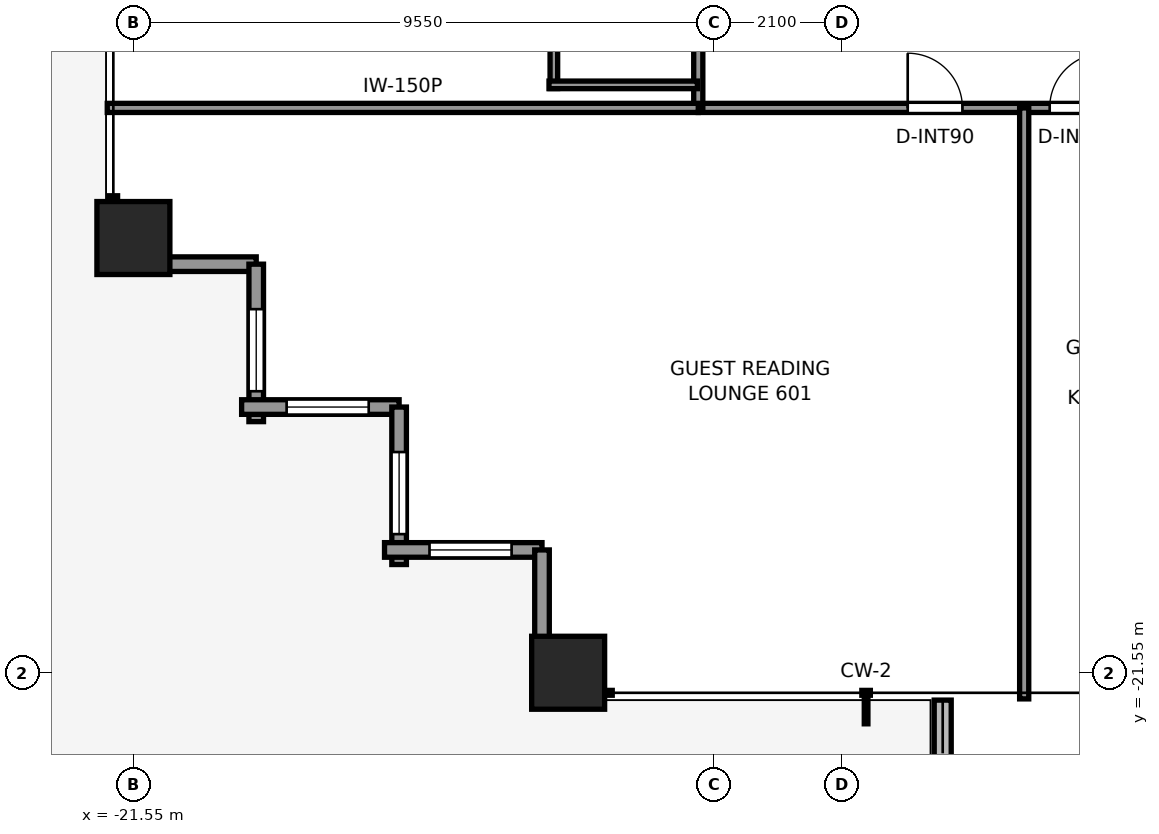
"""IFC4 building model, lengths in metres.
Left out: names, types, materials, properties, quantities, classifications, styles, units other than length and angle.
Written with IfcOpenShell. Run it as: python <this file> out.ifc"""

import sys

from ifc_helpers import new_model, si_unit, direction, frame, frame_2d, origin, origin_2d, place, context, subcontext, project, spatial, rectangle, extrude, element, fill, save


model = new_model("IFC4")
c1 = context("Model", 3, precision=1e-05, world=origin(), true_north=direction((0.0, 1.0)))
c2 = subcontext(c1, "Body", "Model", "MODEL_VIEW")
j1 = project(units=[si_unit("LENGTHUNIT", "METRE"), si_unit("PLANEANGLEUNIT", "RADIAN")], contexts=[c1])
p1 = place(None, origin())
s1 = spatial("IfcSite", under=j1, at=p1, CompositionType="ELEMENT")
p2 = place(p1, origin())
s2 = spatial("IfcBuilding", under=s1, at=p2, CompositionType="ELEMENT")
p3 = place(p2, frame((0.0, 0.0, 23.8)))
s3 = spatial("IfcBuildingStorey", under=s2, at=p3, CompositionType="ELEMENT", Elevation=23.8)
for number, where, z_axis, x_axis in (
    (1, (-14.4, -21.55, 0.0), (0.0, 0.0, 1.0), (1.0, 0.0, 0.0)),
    (2, (-21.55, -14.4, 0.0), (0.0, 0.0, 1.0), (1.0, 0.0, 0.0)),
):
    element("IfcColumn", number, at=place(p3, frame(where, z_axis=z_axis, x_axis=x_axis)), inside=s3, PredefinedType="COLUMN", context=c2, shape_type="SweptSolid", body=[
        extrude(rectangle(XDim=1.2, YDim=1.2, at=origin_2d()), origin(), (0.0, 0.0, 1.0), 3.3),
    ])
p4 = place(p3, frame((-8.24, -22.0, -0.06), z_axis=(0.0, 0.0, 1.0), x_axis=(0.0, -1.0, 0.0)))
e3 = element("IfcWall", 3, at=p4, inside=s3, PredefinedType="PARAPET", context=c2, shape_type="SweptSolid", body=[
    extrude(rectangle(XDim=2.674, YDim=0.28, at=frame_2d((1.337, 0.0))), origin(), (0.0, 0.0, 1.0), 0.42),
])
p5 = place(p3, frame((-19.53, -14.83, 0.0), z_axis=(0.0, 0.0, 1.0), x_axis=(-1.0, 0.0, 0.0)))
e4 = element("IfcWall", 4, at=p5, inside=s3, PredefinedType="STANDARD", context=c2, shape_type="SweptSolid", body=[
    extrude(rectangle(XDim=2.59, YDim=0.24, at=frame_2d((1.295, 0.0))), origin(), (0.0, 0.0, 1.0), 2.439),
])
p6 = place(p3, frame((-19.53, -17.42, 0.0), z_axis=(0.0, 0.0, 1.0), x_axis=(0.0, 1.0, 0.0)))
e5 = element("IfcWall", 5, at=p6, inside=s3, PredefinedType="STANDARD", context=c2, shape_type="SweptSolid", body=[
    extrude(rectangle(XDim=2.59, YDim=0.24, at=frame_2d((1.295, 0.0))), origin(), (0.0, 0.0, 1.0), 2.439),
])
p7 = place(p6, frame((0.5, 0.0, 0.65)))
e6 = element("IfcOpeningElement", 6, at=p7, cuts=e5, PredefinedType="OPENING", context=c2, shape_type="SweptSolid", body=[
    extrude(rectangle(XDim=1.35, YDim=1.55, at=frame_2d((0.675, 0.775))), frame((0.0, 0.13, 0.0), z_axis=(0.0, -1.0, 0.0), x_axis=(1.0, 0.0, 0.0)), (0.0, 0.0, 1.0), 0.26),
])
p8 = place(p3, frame((-17.18, -17.18, 0.0), z_axis=(0.0, 0.0, 1.0), x_axis=(-1.0, 0.0, 0.0)))
e7 = element("IfcWall", 7, at=p8, inside=s3, PredefinedType="STANDARD", context=c2, shape_type="SweptSolid", body=[
    extrude(rectangle(XDim=2.59, YDim=0.24, at=frame_2d((1.295, 0.0))), origin(), (0.0, 0.0, 1.0), 2.439),
])
p9 = place(p8, frame((0.5, 0.0, 0.65)))
e8 = element("IfcOpeningElement", 8, at=p9, cuts=e7, PredefinedType="OPENING", context=c2, shape_type="SweptSolid", body=[
    extrude(rectangle(XDim=1.35, YDim=1.55, at=frame_2d((0.675, 0.775))), frame((0.0, 0.13, 0.0), z_axis=(0.0, -1.0, 0.0), x_axis=(1.0, 0.0, 0.0)), (0.0, 0.0, 1.0), 0.26),
])
p10 = place(p3, frame((-17.18, -19.77, 0.0), z_axis=(0.0, 0.0, 1.0), x_axis=(0.0, 1.0, 0.0)))
e9 = element("IfcWall", 9, at=p10, inside=s3, PredefinedType="STANDARD", context=c2, shape_type="SweptSolid", body=[
    extrude(rectangle(XDim=2.59, YDim=0.24, at=frame_2d((1.295, 0.0))), origin(), (0.0, 0.0, 1.0), 2.439),
])
p11 = place(p10, frame((0.5, 0.0, 0.65)))
e10 = element("IfcOpeningElement", 10, at=p11, cuts=e9, PredefinedType="OPENING", context=c2, shape_type="SweptSolid", body=[
    extrude(rectangle(XDim=1.35, YDim=1.55, at=frame_2d((0.675, 0.775))), frame((0.0, 0.13, 0.0), z_axis=(0.0, -1.0, 0.0), x_axis=(1.0, 0.0, 0.0)), (0.0, 0.0, 1.0), 0.26),
])
p12 = place(p3, frame((-14.83, -19.53, 0.0), z_axis=(0.0, 0.0, 1.0), x_axis=(-1.0, 0.0, 0.0)))
e11 = element("IfcWall", 11, at=p12, inside=s3, PredefinedType="STANDARD", context=c2, shape_type="SweptSolid", body=[
    extrude(rectangle(XDim=2.59, YDim=0.24, at=frame_2d((1.295, 0.0))), origin(), (0.0, 0.0, 1.0), 2.439),
])
p13 = place(p12, frame((0.5, 0.0, 0.65)))
e12 = element("IfcOpeningElement", 12, at=p13, cuts=e11, PredefinedType="OPENING", context=c2, shape_type="SweptSolid", body=[
    extrude(rectangle(XDim=1.35, YDim=1.55, at=frame_2d((0.675, 0.775))), frame((0.0, 0.13, 0.0), z_axis=(0.0, -1.0, 0.0), x_axis=(1.0, 0.0, 0.0)), (0.0, 0.0, 1.0), 0.26),
])
p14 = place(p3, frame((-14.83, -22.12, 0.0), z_axis=(0.0, 0.0, 1.0), x_axis=(0.0, 1.0, 0.0)))
e13 = element("IfcWall", 13, at=p14, inside=s3, PredefinedType="STANDARD", context=c2, shape_type="SweptSolid", body=[
    extrude(rectangle(XDim=2.59, YDim=0.24, at=frame_2d((1.295, 0.0))), origin(), (0.0, 0.0, 1.0), 2.439),
])
p15 = place(p3, frame((-12.26, -12.26, 0.0), z_axis=(0.0, 0.0, 1.0), x_axis=(1.0, 0.0, 0.0)))
e14 = element("IfcWall", 14, at=p15, inside=s3, PredefinedType="PARTITIONING", context=c2, shape_type="SweptSolid", body=[
    extrude(rectangle(XDim=24.68, YDim=0.15, at=frame_2d((12.34, 0.0))), origin(), (0.0, 0.0, 1.0), 2.272),
])
p16 = place(p15, frame((3.444, 0.0, 0.0)))
e15 = element("IfcOpeningElement", 15, at=p16, cuts=e14, PredefinedType="OPENING", context=c2, shape_type="SweptSolid", body=[
    extrude(rectangle(XDim=0.9, YDim=2.06, at=frame_2d((0.45, 1.03))), frame((0.0, 0.085, 0.0), z_axis=(0.0, -1.0, 0.0), x_axis=(1.0, 0.0, 0.0)), (0.0, 0.0, 1.0), 0.17),
])
p17 = place(p15, frame((5.779, 0.0, 0.0)))
e16 = element("IfcOpeningElement", 16, at=p17, cuts=e14, PredefinedType="OPENING", context=c2, shape_type="SweptSolid", body=[
    extrude(rectangle(XDim=0.9, YDim=2.06, at=frame_2d((0.45, 1.03))), frame((0.0, 0.085, 0.0), z_axis=(0.0, -1.0, 0.0), x_axis=(1.0, 0.0, 0.0)), (0.0, 0.0, 1.0), 0.17),
])
p18 = place(p15, frame((13.551, 0.0, 0.0)))
e17 = element("IfcOpeningElement", 17, at=p18, cuts=e14, PredefinedType="OPENING", context=c2, shape_type="SweptSolid", body=[
    extrude(rectangle(XDim=0.9, YDim=2.06, at=frame_2d((0.45, 1.03))), frame((0.0, 0.085, 0.0), z_axis=(0.0, -1.0, 0.0), x_axis=(1.0, 0.0, 0.0)), (0.0, 0.0, 1.0), 0.17),
])
p19 = place(p15, frame((17.921, 0.0, 0.0)))
e18 = element("IfcOpeningElement", 18, at=p19, cuts=e14, PredefinedType="OPENING", context=c2, shape_type="SweptSolid", body=[
    extrude(rectangle(XDim=0.9, YDim=2.06, at=frame_2d((0.45, 1.03))), frame((0.0, 0.085, 0.0), z_axis=(0.0, -1.0, 0.0), x_axis=(1.0, 0.0, 0.0)), (0.0, 0.0, 1.0), 0.17),
])
p20 = place(p15, frame((20.256, 0.0, 0.0)))
e19 = element("IfcOpeningElement", 19, at=p20, cuts=e14, PredefinedType="OPENING", context=c2, shape_type="SweptSolid", body=[
    extrude(rectangle(XDim=0.9, YDim=2.06, at=frame_2d((0.45, 1.03))), frame((0.0, 0.085, 0.0), z_axis=(0.0, -1.0, 0.0), x_axis=(1.0, 0.0, 0.0)), (0.0, 0.0, 1.0), 0.17),
])
p21 = place(p3, frame((-12.26, -12.26, 0.0), z_axis=(0.0, 0.0, 1.0), x_axis=(0.0, 1.0, 0.0)))
e20 = element("IfcWall", 20, at=p21, inside=s3, PredefinedType="PARTITIONING", context=c2, shape_type="SweptSolid", body=[
    extrude(rectangle(XDim=24.84, YDim=0.15, at=frame_2d((12.42, 0.0))), origin(), (0.0, 0.0, 1.0), 2.272),
])
p22 = place(p21, frame((4.395, 0.0, 0.0)))
e21 = element("IfcOpeningElement", 21, at=p22, cuts=e20, PredefinedType="OPENING", context=c2, shape_type="SweptSolid", body=[
    extrude(rectangle(XDim=0.95, YDim=2.06, at=frame_2d((0.475, 1.03))), frame((0.0, 0.085, 0.0), z_axis=(0.0, -1.0, 0.0), x_axis=(1.0, 0.0, 0.0)), (0.0, 0.0, 1.0), 0.17),
])
p23 = place(p21, frame((13.815, 0.0, 0.0)))
e22 = element("IfcOpeningElement", 22, at=p23, cuts=e20, PredefinedType="OPENING", context=c2, shape_type="SweptSolid", body=[
    extrude(rectangle(XDim=0.95, YDim=2.06, at=frame_2d((0.475, 1.03))), frame((0.0, 0.085, 0.0), z_axis=(0.0, -1.0, 0.0), x_axis=(1.0, 0.0, 0.0)), (0.0, 0.0, 1.0), 0.17),
])
p24 = place(p21, frame((20.268, 0.0, 0.0)))
e23 = element("IfcOpeningElement", 23, at=p24, cuts=e20, PredefinedType="OPENING", context=c2, shape_type="SweptSolid", body=[
    extrude(rectangle(XDim=0.95, YDim=2.06, at=frame_2d((0.475, 1.03))), frame((0.0, 0.085, 0.0), z_axis=(0.0, -1.0, 0.0), x_axis=(1.0, 0.0, 0.0)), (0.0, 0.0, 1.0), 0.17),
])
p25 = place(p3, frame((-21.98, -12.26, 0.0), z_axis=(0.0, 0.0, 1.0), x_axis=(1.0, 0.0, 0.0)))
e24 = element("IfcWall", 24, at=p25, inside=s3, PredefinedType="PARTITIONING", context=c2, shape_type="SweptSolid", body=[
    extrude(rectangle(XDim=9.72, YDim=0.15, at=frame_2d((4.86, 0.0))), origin(), (0.0, 0.0, 1.0), 2.272),
])
p26 = place(p3, frame((-6.9, -21.98, 0.0), z_axis=(0.0, 0.0, 1.0), x_axis=(0.0, 1.0, 0.0)))
e25 = element("IfcWall", 25, at=p26, inside=s3, PredefinedType="PARTITIONING", context=c2, shape_type="SweptSolid", body=[
    extrude(rectangle(XDim=9.72, YDim=0.15, at=frame_2d((4.86, 0.0))), origin(), (0.0, 0.0, 1.0), 2.429),
])
p27 = place(p3, frame((-14.635, -11.941, 0.0), z_axis=(0.0, 0.0, 1.0), x_axis=(0.0, 1.0, 0.0)))
e26 = element("IfcWall", 26, at=p27, inside=s3, PredefinedType="PARTITIONING", context=c2, shape_type="SweptSolid", body=[
    extrude(rectangle(XDim=2.27, YDim=0.125, at=frame_2d((1.135, 0.0))), origin(), (0.0, 0.0, 1.0), 2.272),
])
p28 = place(p3, frame((-14.715, -11.881, 0.0), z_axis=(0.0, 0.0, 1.0), x_axis=(1.0, 0.0, 0.0)))
e27 = element("IfcWall", 27, at=p28, inside=s3, PredefinedType="PARTITIONING", context=c2, shape_type="SweptSolid", body=[
    extrude(rectangle(XDim=2.44, YDim=0.125, at=frame_2d((1.22, 0.0))), origin(), (0.0, 0.0, 1.0), 2.272),
])
p29 = place(p7, origin())
e28 = element("IfcWindow", 28, at=p29, inside=s3, PartitioningType="SINGLE_PANEL", PredefinedType="WINDOW", context=c2, shape_type="SweptSolid", body=[
    extrude(rectangle(XDim=1.35, YDim=1.55, at=frame_2d((0.675, 0.775))), frame((0.0, 0.03, 0.0), z_axis=(0.0, -1.0, 0.0), x_axis=(1.0, 0.0, 0.0)), (0.0, 0.0, 1.0), 0.06),
])
fill(e6, e28)
p30 = place(p9, origin())
e29 = element("IfcWindow", 29, at=p30, inside=s3, PartitioningType="SINGLE_PANEL", PredefinedType="WINDOW", context=c2, shape_type="SweptSolid", body=[
    extrude(rectangle(XDim=1.35, YDim=1.55, at=frame_2d((0.675, 0.775))), frame((0.0, 0.03, 0.0), z_axis=(0.0, -1.0, 0.0), x_axis=(1.0, 0.0, 0.0)), (0.0, 0.0, 1.0), 0.06),
])
fill(e8, e29)
p31 = place(p11, origin())
e30 = element("IfcWindow", 30, at=p31, inside=s3, PartitioningType="SINGLE_PANEL", PredefinedType="WINDOW", context=c2, shape_type="SweptSolid", body=[
    extrude(rectangle(XDim=1.35, YDim=1.55, at=frame_2d((0.675, 0.775))), frame((0.0, 0.03, 0.0), z_axis=(0.0, -1.0, 0.0), x_axis=(1.0, 0.0, 0.0)), (0.0, 0.0, 1.0), 0.06),
])
fill(e10, e30)
p32 = place(p13, origin())
e31 = element("IfcWindow", 31, at=p32, inside=s3, PartitioningType="SINGLE_PANEL", PredefinedType="WINDOW", context=c2, shape_type="SweptSolid", body=[
    extrude(rectangle(XDim=1.35, YDim=1.55, at=frame_2d((0.675, 0.775))), frame((0.0, 0.03, 0.0), z_axis=(0.0, -1.0, 0.0), x_axis=(1.0, 0.0, 0.0)), (0.0, 0.0, 1.0), 0.06),
])
fill(e12, e31)
p33 = place(p16, origin())
e32 = element("IfcDoor", 32, at=p33, inside=s3, OperationType="SINGLE_SWING_LEFT", PredefinedType="DOOR", context=c2, shape_type="SweptSolid", body=[
    extrude(rectangle(XDim=0.9, YDim=2.06, at=frame_2d((0.45, 1.03))), frame((0.0, 0.025, 0.0), z_axis=(0.0, -1.0, 0.0), x_axis=(1.0, 0.0, 0.0)), (0.0, 0.0, 1.0), 0.05),
])
fill(e15, e32)
p34 = place(p17, origin())
e33 = element("IfcDoor", 33, at=p34, inside=s3, OperationType="SINGLE_SWING_RIGHT", PredefinedType="DOOR", context=c2, shape_type="SweptSolid", body=[
    extrude(rectangle(XDim=0.9, YDim=2.06, at=frame_2d((0.45, 1.03))), frame((0.0, 0.025, 0.0), z_axis=(0.0, -1.0, 0.0), x_axis=(1.0, 0.0, 0.0)), (0.0, 0.0, 1.0), 0.05),
])
fill(e16, e33)
save(model, sys.argv[1])
